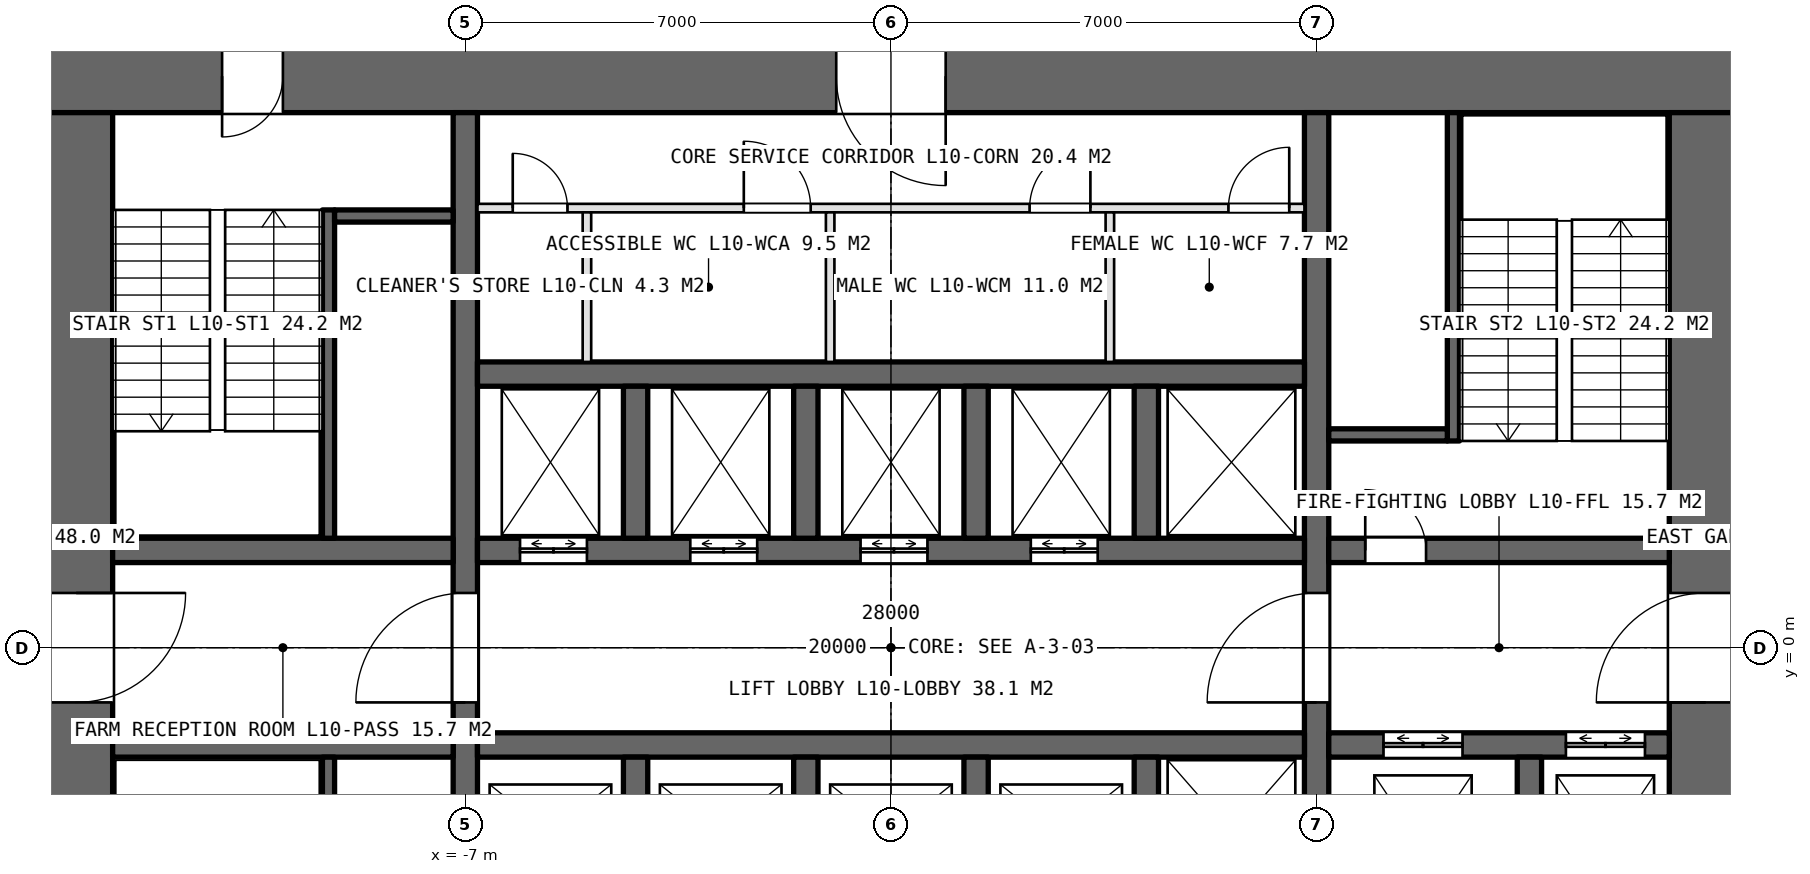
"""IFC4 building model, lengths in metres.
Left out: names, types, materials, properties, quantities, classifications, styles, units other than length and angle.
Written with IfcOpenShell. Run it as: python <this file> out.ifc"""

import sys

from ifc_helpers import new_model, si_unit, direction, frame, frame_2d, origin, place, context, subcontext, project, spatial, rectangle, extrude, element, fill, save


model = new_model("IFC4")
c1 = context("Model", 3, precision=1e-05, world=origin(), true_north=direction((0.0, 1.0)))
c2 = subcontext(c1, "Body", "Model", "MODEL_VIEW")
j1 = project(units=[si_unit("LENGTHUNIT", "METRE"), si_unit("PLANEANGLEUNIT", "RADIAN")], contexts=[c1])
p1 = place(None, origin())
s1 = spatial("IfcSite", under=j1, at=p1, CompositionType="ELEMENT")
p2 = place(p1, origin())
s2 = spatial("IfcBuilding", under=s1, at=p2, CompositionType="ELEMENT")
p3 = place(p2, frame((0.0, 0.0, 50.0)))
s3 = spatial("IfcBuildingStorey", under=s2, at=p3, CompositionType="ELEMENT", Elevation=50.0)
p4 = place(p3, frame((14.0, 9.4, 0.0), z_axis=(0.0, 0.0, 1.0), x_axis=(-1.0, 0.0, 0.0)))
e1 = element("IfcWall", 1, at=p4, inside=s3, PredefinedType="SHEAR", context=c2, shape_type="SweptSolid", body=[
    extrude(rectangle(XDim=28.0, YDim=1.2, at=frame_2d((14.0, 0.0))), origin(), (0.0, 0.0, 1.0), 5.0),
])
p5 = place(p4, frame((24.0, 0.0, 0.0)))
e2 = element("IfcOpeningElement", 2, at=p5, cuts=e1, PredefinedType="OPENING", context=c2, shape_type="SweptSolid", body=[
    extrude(rectangle(XDim=1.0, YDim=2.4, at=frame_2d((0.5, 1.2))), frame((0.0, 0.61, 0.0), z_axis=(0.0, -1.0, 0.0), x_axis=(1.0, 0.0, 0.0)), (0.0, 0.0, 1.0), 1.22),
])
p6 = place(p4, frame((13.1, 0.0, 0.0)))
e3 = element("IfcOpeningElement", 3, at=p6, cuts=e1, PredefinedType="OPENING", context=c2, shape_type="SweptSolid", body=[
    extrude(rectangle(XDim=1.8, YDim=2.4, at=frame_2d((0.9, 1.2))), frame((0.0, 0.61, 0.0), z_axis=(0.0, -1.0, 0.0), x_axis=(1.0, 0.0, 0.0)), (0.0, 0.0, 1.0), 1.22),
])
p7 = place(p3, frame((-13.4, 8.8, 0.0), z_axis=(0.0, 0.0, 1.0), x_axis=(0.0, -1.0, 0.0)))
e4 = element("IfcWall", 4, at=p7, inside=s3, PredefinedType="SHEAR", context=c2, shape_type="SweptSolid", body=[
    extrude(rectangle(XDim=17.6, YDim=1.2, at=frame_2d((8.8, 0.0))), origin(), (0.0, 0.0, 1.0), 5.0),
])
p8 = place(p7, frame((7.9, 0.0, 0.0)))
e5 = element("IfcOpeningElement", 5, at=p8, cuts=e4, PredefinedType="OPENING", context=c2, shape_type="SweptSolid", body=[
    extrude(rectangle(XDim=1.8, YDim=2.4, at=frame_2d((0.9, 1.2))), frame((0.0, 0.61, 0.0), z_axis=(0.0, -1.0, 0.0), x_axis=(1.0, 0.0, 0.0)), (0.0, 0.0, 1.0), 1.22),
])
p9 = place(p7, frame((16.5, 0.0, 0.0)))
e6 = element("IfcOpeningElement", 6, at=p9, cuts=e4, PredefinedType="OPENING", context=c2, shape_type="SweptSolid", body=[
    extrude(rectangle(XDim=1.0, YDim=2.4, at=frame_2d((0.5, 1.2))), frame((0.0, 0.61, 0.0), z_axis=(0.0, -1.0, 0.0), x_axis=(1.0, 0.0, 0.0)), (0.0, 0.0, 1.0), 1.22),
])
p10 = place(p3, frame((13.4, -8.8, 0.0), z_axis=(0.0, 0.0, 1.0), x_axis=(0.0, 1.0, 0.0)))
e7 = element("IfcWall", 7, at=p10, inside=s3, PredefinedType="SHEAR", context=c2, shape_type="SweptSolid", body=[
    extrude(rectangle(XDim=17.6, YDim=1.2, at=frame_2d((8.8, 0.0))), origin(), (0.0, 0.0, 1.0), 5.0),
])
p11 = place(p10, frame((7.9, 0.0, 0.0)))
e8 = element("IfcOpeningElement", 8, at=p11, cuts=e7, PredefinedType="OPENING", context=c2, shape_type="SweptSolid", body=[
    extrude(rectangle(XDim=1.8, YDim=2.4, at=frame_2d((0.9, 1.2))), frame((0.0, 0.61, 0.0), z_axis=(0.0, -1.0, 0.0), x_axis=(1.0, 0.0, 0.0)), (0.0, 0.0, 1.0), 1.22),
])
p12 = place(p3, frame((-7.0, -8.8, 0.0), z_axis=(0.0, 0.0, 1.0), x_axis=(0.0, 1.0, 0.0)))
e9 = element("IfcWall", 9, at=p12, inside=s3, PredefinedType="SHEAR", context=c2, shape_type="SweptSolid", body=[
    extrude(rectangle(XDim=17.6, YDim=0.4, at=frame_2d((8.8, 0.0))), origin(), (0.0, 0.0, 1.0), 5.0),
])
p13 = place(p12, frame((7.9, 0.0, 0.0)))
e10 = element("IfcOpeningElement", 10, at=p13, cuts=e9, PredefinedType="OPENING", context=c2, shape_type="SweptSolid", body=[
    extrude(rectangle(XDim=1.8, YDim=2.4, at=frame_2d((0.9, 1.2))), frame((0.0, 0.21, 0.0), z_axis=(0.0, -1.0, 0.0), x_axis=(1.0, 0.0, 0.0)), (0.0, 0.0, 1.0), 0.42),
])
p14 = place(p3, frame((7.0, -8.8, 0.0), z_axis=(0.0, 0.0, 1.0), x_axis=(0.0, 1.0, 0.0)))
e11 = element("IfcWall", 11, at=p14, inside=s3, PredefinedType="SHEAR", context=c2, shape_type="SweptSolid", body=[
    extrude(rectangle(XDim=17.6, YDim=0.4, at=frame_2d((8.8, 0.0))), origin(), (0.0, 0.0, 1.0), 5.0),
])
p15 = place(p14, frame((7.9, 0.0, 0.0)))
e12 = element("IfcOpeningElement", 12, at=p15, cuts=e11, PredefinedType="OPENING", context=c2, shape_type="SweptSolid", body=[
    extrude(rectangle(XDim=1.8, YDim=2.4, at=frame_2d((0.9, 1.2))), frame((0.0, 0.21, 0.0), z_axis=(0.0, -1.0, 0.0), x_axis=(1.0, 0.0, 0.0)), (0.0, 0.0, 1.0), 0.42),
])
p16 = place(p3, frame((-6.8, 1.6, 0.0), z_axis=(0.0, 0.0, 1.0), x_axis=(1.0, 0.0, 0.0)))
e13 = element("IfcWall", 13, at=p16, inside=s3, PredefinedType="SHEAR", context=c2, shape_type="SweptSolid", body=[
    extrude(rectangle(XDim=13.6, YDim=0.4, at=frame_2d((6.8, 0.0))), origin(), (0.0, 0.0, 1.0), 5.0),
])
p17 = place(p16, frame((0.7, 0.0, 0.0)))
e14 = element("IfcOpeningElement", 14, at=p17, cuts=e13, PredefinedType="OPENING", context=c2, shape_type="SweptSolid", body=[
    extrude(rectangle(XDim=1.1, YDim=2.4, at=frame_2d((0.55, 1.2))), frame((0.0, 0.21, 0.0), z_axis=(0.0, -1.0, 0.0), x_axis=(1.0, 0.0, 0.0)), (0.0, 0.0, 1.0), 0.42),
])
p18 = place(p16, frame((3.5, 0.0, 0.0)))
e15 = element("IfcOpeningElement", 15, at=p18, cuts=e13, PredefinedType="OPENING", context=c2, shape_type="SweptSolid", body=[
    extrude(rectangle(XDim=1.1, YDim=2.4, at=frame_2d((0.55, 1.2))), frame((0.0, 0.21, 0.0), z_axis=(0.0, -1.0, 0.0), x_axis=(1.0, 0.0, 0.0)), (0.0, 0.0, 1.0), 0.42),
])
p19 = place(p16, frame((6.3, 0.0, 0.0)))
e16 = element("IfcOpeningElement", 16, at=p19, cuts=e13, PredefinedType="OPENING", context=c2, shape_type="SweptSolid", body=[
    extrude(rectangle(XDim=1.1, YDim=2.4, at=frame_2d((0.55, 1.2))), frame((0.0, 0.21, 0.0), z_axis=(0.0, -1.0, 0.0), x_axis=(1.0, 0.0, 0.0)), (0.0, 0.0, 1.0), 0.42),
])
p20 = place(p16, frame((9.1, 0.0, 0.0)))
e17 = element("IfcOpeningElement", 17, at=p20, cuts=e13, PredefinedType="OPENING", context=c2, shape_type="SweptSolid", body=[
    extrude(rectangle(XDim=1.1, YDim=2.4, at=frame_2d((0.55, 1.2))), frame((0.0, 0.21, 0.0), z_axis=(0.0, -1.0, 0.0), x_axis=(1.0, 0.0, 0.0)), (0.0, 0.0, 1.0), 0.42),
])
for number, where, z_axis, x_axis in (
    (18, (-6.8, -1.6, 0.0), (0.0, 0.0, 1.0), (1.0, 0.0, 0.0)),
    (19, (-6.8, 4.5, 0.0), (0.0, 0.0, 1.0), (1.0, 0.0, 0.0)),
):
    element("IfcWall", number, at=place(p3, frame(where, z_axis=z_axis, x_axis=x_axis)), inside=s3, PredefinedType="SHEAR", context=c2, shape_type="SweptSolid", body=[
        extrude(rectangle(XDim=13.6, YDim=0.4, at=frame_2d((6.8, 0.0))), origin(), (0.0, 0.0, 1.0), 5.0),
    ])
for number, where, z_axis, x_axis in (
    (20, (-12.8, 1.6, 0.0), (0.0, 0.0, 1.0), (1.0, 0.0, 0.0)),
    (21, (-12.8, -1.6, 0.0), (0.0, 0.0, 1.0), (1.0, 0.0, 0.0)),
):
    element("IfcWall", number, at=place(p3, frame(where, z_axis=z_axis, x_axis=x_axis)), inside=s3, PredefinedType="SHEAR", context=c2, shape_type="SweptSolid", body=[
        extrude(rectangle(XDim=5.6, YDim=0.4, at=frame_2d((2.8, 0.0))), origin(), (0.0, 0.0, 1.0), 5.0),
    ])
p21 = place(p3, frame((7.2, 1.6, 0.0), z_axis=(0.0, 0.0, 1.0), x_axis=(1.0, 0.0, 0.0)))
e22 = element("IfcWall", 22, at=p21, inside=s3, PredefinedType="SHEAR", context=c2, shape_type="SweptSolid", body=[
    extrude(rectangle(XDim=5.6, YDim=0.4, at=frame_2d((2.8, 0.0))), origin(), (0.0, 0.0, 1.0), 5.0),
])
p22 = place(p21, frame((0.6, 0.0, 0.0)))
e23 = element("IfcOpeningElement", 23, at=p22, cuts=e22, PredefinedType="OPENING", context=c2, shape_type="SweptSolid", body=[
    extrude(rectangle(XDim=1.0, YDim=2.4, at=frame_2d((0.5, 1.2))), frame((0.0, 0.21, 0.0), z_axis=(0.0, -1.0, 0.0), x_axis=(1.0, 0.0, 0.0)), (0.0, 0.0, 1.0), 0.42),
])
p23 = place(p3, frame((7.2, -1.6, 0.0), z_axis=(0.0, 0.0, 1.0), x_axis=(1.0, 0.0, 0.0)))
e24 = element("IfcWall", 24, at=p23, inside=s3, PredefinedType="SHEAR", context=c2, shape_type="SweptSolid", body=[
    extrude(rectangle(XDim=5.6, YDim=0.4, at=frame_2d((2.8, 0.0))), origin(), (0.0, 0.0, 1.0), 5.0),
])
p24 = place(p23, frame((0.9, 0.0, 0.0)))
e25 = element("IfcOpeningElement", 25, at=p24, cuts=e24, PredefinedType="OPENING", context=c2, shape_type="SweptSolid", body=[
    extrude(rectangle(XDim=1.3, YDim=2.4, at=frame_2d((0.65, 1.2))), frame((0.0, 0.21, 0.0), z_axis=(0.0, -1.0, 0.0), x_axis=(1.0, 0.0, 0.0)), (0.0, 0.0, 1.0), 0.42),
])
p25 = place(p23, frame((3.9, 0.0, 0.0)))
e26 = element("IfcOpeningElement", 26, at=p25, cuts=e24, PredefinedType="OPENING", context=c2, shape_type="SweptSolid", body=[
    extrude(rectangle(XDim=1.3, YDim=2.4, at=frame_2d((0.65, 1.2))), frame((0.0, 0.21, 0.0), z_axis=(0.0, -1.0, 0.0), x_axis=(1.0, 0.0, 0.0)), (0.0, 0.0, 1.0), 0.42),
])
p26 = place(p3, frame((10.5, -4.8, 0.0), z_axis=(0.0, 0.0, 1.0), x_axis=(0.0, 1.0, 0.0)))
e27 = element("IfcWall", 27, at=p26, inside=s3, PredefinedType="SHEAR", context=c2, shape_type="SweptSolid", body=[
    extrude(rectangle(XDim=3.0, YDim=0.4, at=frame_2d((1.5, 0.0))), origin(), (0.0, 0.0, 1.0), 5.0),
])
for number, where, z_axis, x_axis in (
    (28, (-4.2, 1.8, 0.0), (0.0, 0.0, 1.0), (0.0, 1.0, 0.0)),
    (29, (-4.2, -4.3, 0.0), (0.0, 0.0, 1.0), (0.0, 1.0, 0.0)),
    (30, (-1.4, 1.8, 0.0), (0.0, 0.0, 1.0), (0.0, 1.0, 0.0)),
    (31, (-1.4, -4.3, 0.0), (0.0, 0.0, 1.0), (0.0, 1.0, 0.0)),
    (32, (1.4, 1.8, 0.0), (0.0, 0.0, 1.0), (0.0, 1.0, 0.0)),
    (33, (1.4, -4.3, 0.0), (0.0, 0.0, 1.0), (0.0, 1.0, 0.0)),
    (34, (4.2, 1.8, 0.0), (0.0, 0.0, 1.0), (0.0, 1.0, 0.0)),
    (35, (4.2, -4.3, 0.0), (0.0, 0.0, 1.0), (0.0, 1.0, 0.0)),
):
    element("IfcWall", number, at=place(p3, frame(where, z_axis=z_axis, x_axis=x_axis)), inside=s3, PredefinedType="SHEAR", context=c2, shape_type="SweptSolid", body=[
        extrude(rectangle(XDim=2.5, YDim=0.4, at=frame_2d((1.25, 0.0))), origin(), (0.0, 0.0, 1.0), 5.0),
    ])
p27 = place(p3, frame((-6.8, 7.23, 0.0), z_axis=(0.0, 0.0, 1.0), x_axis=(1.0, 0.0, 0.0)))
e36 = element("IfcWall", 36, at=p27, inside=s3, PredefinedType="PARTITIONING", context=c2, shape_type="SweptSolid", body=[
    extrude(rectangle(XDim=13.6, YDim=0.14, at=frame_2d((6.8, 0.0))), origin(), (0.0, 0.0, 1.0), 4.75),
])
p28 = place(p27, frame((0.58, 0.0, 0.0)))
e37 = element("IfcOpeningElement", 37, at=p28, cuts=e36, PredefinedType="OPENING", context=c2, shape_type="SweptSolid", body=[
    extrude(rectangle(XDim=0.9, YDim=2.4, at=frame_2d((0.45, 1.2))), frame((0.0, 0.08, 0.0), z_axis=(0.0, -1.0, 0.0), x_axis=(1.0, 0.0, 0.0)), (0.0, 0.0, 1.0), 0.16),
])
p29 = place(p27, frame((4.38, 0.0, 0.0)))
e38 = element("IfcOpeningElement", 38, at=p29, cuts=e36, PredefinedType="OPENING", context=c2, shape_type="SweptSolid", body=[
    extrude(rectangle(XDim=1.1, YDim=2.4, at=frame_2d((0.55, 1.2))), frame((0.0, 0.08, 0.0), z_axis=(0.0, -1.0, 0.0), x_axis=(1.0, 0.0, 0.0)), (0.0, 0.0, 1.0), 0.16),
])
p30 = place(p27, frame((9.08, 0.0, 0.0)))
e39 = element("IfcOpeningElement", 39, at=p30, cuts=e36, PredefinedType="OPENING", context=c2, shape_type="SweptSolid", body=[
    extrude(rectangle(XDim=1.0, YDim=2.4, at=frame_2d((0.5, 1.2))), frame((0.0, 0.08, 0.0), z_axis=(0.0, -1.0, 0.0), x_axis=(1.0, 0.0, 0.0)), (0.0, 0.0, 1.0), 0.16),
])
p31 = place(p27, frame((12.35, 0.0, 0.0)))
e40 = element("IfcOpeningElement", 40, at=p31, cuts=e36, PredefinedType="OPENING", context=c2, shape_type="SweptSolid", body=[
    extrude(rectangle(XDim=1.0, YDim=2.4, at=frame_2d((0.5, 1.2))), frame((0.0, 0.08, 0.0), z_axis=(0.0, -1.0, 0.0), x_axis=(1.0, 0.0, 0.0)), (0.0, 0.0, 1.0), 0.16),
])
for number, where, z_axis, x_axis in (
    (41, (-5.0, 4.7, 0.0), (0.0, 0.0, 1.0), (0.0, 1.0, 0.0)),
    (42, (-1.0, 4.7, 0.0), (0.0, 0.0, 1.0), (0.0, 1.0, 0.0)),
    (43, (3.6, 4.7, 0.0), (0.0, 0.0, 1.0), (0.0, 1.0, 0.0)),
):
    element("IfcWall", number, at=place(p3, frame(where, z_axis=z_axis, x_axis=x_axis)), inside=s3, PredefinedType="PARTITIONING", context=c2, shape_type="SweptSolid", body=[
        extrude(rectangle(XDim=2.46, YDim=0.14, at=frame_2d((1.23, 0.0))), origin(), (0.0, 0.0, 1.0), 4.75),
    ])
p32 = place(p3, frame((-9.25, 7.2, 0.0), z_axis=(0.0, 0.0, 1.0), x_axis=(0.0, -1.0, 0.0)))
e44 = element("IfcWall", 44, at=p32, inside=s3, PredefinedType="SOLIDWALL", context=c2, shape_type="SweptSolid", body=[
    extrude(rectangle(XDim=5.4, YDim=0.2, at=frame_2d((2.7, 0.0))), origin(), (0.0, 0.0, 1.0), 5.0),
])
p33 = place(p3, frame((-9.15, 7.1, 0.0), z_axis=(0.0, 0.0, 1.0), x_axis=(1.0, 0.0, 0.0)))
e45 = element("IfcWall", 45, at=p33, inside=s3, PredefinedType="SOLIDWALL", context=c2, shape_type="SweptSolid", body=[
    extrude(rectangle(XDim=1.95, YDim=0.2, at=frame_2d((0.975, 0.0))), origin(), (0.0, 0.0, 1.0), 5.0),
])
p34 = place(p3, frame((-9.25, -7.2, 0.0), z_axis=(0.0, 0.0, 1.0), x_axis=(0.0, 1.0, 0.0)))
e46 = element("IfcWall", 46, at=p34, inside=s3, PredefinedType="SOLIDWALL", context=c2, shape_type="SweptSolid", body=[
    extrude(rectangle(XDim=5.4, YDim=0.2, at=frame_2d((2.7, 0.0))), origin(), (0.0, 0.0, 1.0), 5.0),
])
p35 = place(p3, frame((9.25, 3.4, 0.0), z_axis=(0.0, 0.0, 1.0), x_axis=(0.0, 1.0, 0.0)))
e47 = element("IfcWall", 47, at=p35, inside=s3, PredefinedType="SOLIDWALL", context=c2, shape_type="SweptSolid", body=[
    extrude(rectangle(XDim=5.4, YDim=0.2, at=frame_2d((2.7, 0.0))), origin(), (0.0, 0.0, 1.0), 5.0),
])
p36 = place(p3, frame((9.15, 3.5, 0.0), z_axis=(0.0, 0.0, 1.0), x_axis=(-1.0, 0.0, 0.0)))
e48 = element("IfcWall", 48, at=p36, inside=s3, PredefinedType="SOLIDWALL", context=c2, shape_type="SweptSolid", body=[
    extrude(rectangle(XDim=1.95, YDim=0.2, at=frame_2d((0.975, 0.0))), origin(), (0.0, 0.0, 1.0), 5.0),
])
p37 = place(p8, origin())
e49 = element("IfcDoor", 49, at=p37, inside=s3, OperationType="DOUBLE_DOOR_SINGLE_SWING", PredefinedType="DOOR", context=c2, shape_type="SweptSolid", body=[
    extrude(rectangle(XDim=1.8, YDim=2.4, at=frame_2d((0.9, 1.2))), frame((0.0, 0.025, 0.0), z_axis=(0.0, -1.0, 0.0), x_axis=(1.0, 0.0, 0.0)), (0.0, 0.0, 1.0), 0.05),
])
fill(e5, e49)
p38 = place(p11, origin())
e50 = element("IfcDoor", 50, at=p38, inside=s3, OperationType="DOUBLE_DOOR_SINGLE_SWING", PredefinedType="DOOR", context=c2, shape_type="SweptSolid", body=[
    extrude(rectangle(XDim=1.8, YDim=2.4, at=frame_2d((0.9, 1.2))), frame((0.0, 0.025, 0.0), z_axis=(0.0, -1.0, 0.0), x_axis=(1.0, 0.0, 0.0)), (0.0, 0.0, 1.0), 0.05),
])
fill(e8, e50)
p39 = place(p13, origin())
e51 = element("IfcDoor", 51, at=p39, inside=s3, OperationType="DOUBLE_DOOR_SINGLE_SWING", PredefinedType="DOOR", context=c2, shape_type="SweptSolid", body=[
    extrude(rectangle(XDim=1.8, YDim=2.4, at=frame_2d((0.9, 1.2))), frame((0.0, 0.025, 0.0), z_axis=(0.0, -1.0, 0.0), x_axis=(1.0, 0.0, 0.0)), (0.0, 0.0, 1.0), 0.05),
])
fill(e10, e51)
p40 = place(p15, origin())
e52 = element("IfcDoor", 52, at=p40, inside=s3, OperationType="DOUBLE_DOOR_SINGLE_SWING", PredefinedType="DOOR", context=c2, shape_type="SweptSolid", body=[
    extrude(rectangle(XDim=1.8, YDim=2.4, at=frame_2d((0.9, 1.2))), frame((0.0, 0.025, 0.0), z_axis=(0.0, -1.0, 0.0), x_axis=(1.0, 0.0, 0.0)), (0.0, 0.0, 1.0), 0.05),
])
fill(e12, e52)
p41 = place(p5, origin())
e53 = element("IfcDoor", 53, at=p41, inside=s3, OperationType="SINGLE_SWING_RIGHT", PredefinedType="DOOR", context=c2, shape_type="SweptSolid", body=[
    extrude(rectangle(XDim=1.0, YDim=2.4, at=frame_2d((0.5, 1.2))), frame((0.0, 0.025, 0.0), z_axis=(0.0, -1.0, 0.0), x_axis=(1.0, 0.0, 0.0)), (0.0, 0.0, 1.0), 0.05),
])
fill(e2, e53)
p42 = place(p22, origin())
e54 = element("IfcDoor", 54, at=p42, inside=s3, OperationType="SINGLE_SWING_LEFT", PredefinedType="DOOR", context=c2, shape_type="SweptSolid", body=[
    extrude(rectangle(XDim=1.0, YDim=2.4, at=frame_2d((0.5, 1.2))), frame((0.0, 0.025, 0.0), z_axis=(0.0, -1.0, 0.0), x_axis=(1.0, 0.0, 0.0)), (0.0, 0.0, 1.0), 0.05),
])
fill(e23, e54)
p43 = place(p28, origin())
e55 = element("IfcDoor", 55, at=p43, inside=s3, OperationType="SINGLE_SWING_LEFT", PredefinedType="DOOR", context=c2, shape_type="SweptSolid", body=[
    extrude(rectangle(XDim=0.9, YDim=2.4, at=frame_2d((0.45, 1.2))), frame((0.0, 0.025, 0.0), z_axis=(0.0, -1.0, 0.0), x_axis=(1.0, 0.0, 0.0)), (0.0, 0.0, 1.0), 0.05),
])
fill(e37, e55)
p44 = place(p29, origin())
e56 = element("IfcDoor", 56, at=p44, inside=s3, OperationType="SINGLE_SWING_LEFT", PredefinedType="DOOR", context=c2, shape_type="SweptSolid", body=[
    extrude(rectangle(XDim=1.1, YDim=2.4, at=frame_2d((0.55, 1.2))), frame((0.0, 0.025, 0.0), z_axis=(0.0, -1.0, 0.0), x_axis=(1.0, 0.0, 0.0)), (0.0, 0.0, 1.0), 0.05),
])
fill(e38, e56)
p45 = place(p30, origin())
e57 = element("IfcDoor", 57, at=p45, inside=s3, OperationType="SINGLE_SWING_RIGHT", PredefinedType="DOOR", context=c2, shape_type="SweptSolid", body=[
    extrude(rectangle(XDim=1.0, YDim=2.4, at=frame_2d((0.5, 1.2))), frame((0.0, 0.025, 0.0), z_axis=(0.0, -1.0, 0.0), x_axis=(1.0, 0.0, 0.0)), (0.0, 0.0, 1.0), 0.05),
])
fill(e39, e57)
p46 = place(p31, origin())
e58 = element("IfcDoor", 58, at=p46, inside=s3, OperationType="SINGLE_SWING_RIGHT", PredefinedType="DOOR", context=c2, shape_type="SweptSolid", body=[
    extrude(rectangle(XDim=1.0, YDim=2.4, at=frame_2d((0.5, 1.2))), frame((0.0, 0.025, 0.0), z_axis=(0.0, -1.0, 0.0), x_axis=(1.0, 0.0, 0.0)), (0.0, 0.0, 1.0), 0.05),
])
fill(e40, e58)
p47 = place(p6, origin())
e59 = element("IfcDoor", 59, at=p47, inside=s3, OperationType="DOUBLE_DOOR_SINGLE_SWING", PredefinedType="DOOR", context=c2, shape_type="SweptSolid", body=[
    extrude(rectangle(XDim=1.8, YDim=2.4, at=frame_2d((0.9, 1.2))), frame((0.0, 0.025, 0.0), z_axis=(0.0, -1.0, 0.0), x_axis=(1.0, 0.0, 0.0)), (0.0, 0.0, 1.0), 0.05),
])
fill(e3, e59)
p48 = place(p17, origin())
e60 = element("IfcDoor", 60, at=p48, inside=s3, OperationType="DOUBLE_DOOR_SLIDING", PredefinedType="DOOR", context=c2, shape_type="SweptSolid", body=[
    extrude(rectangle(XDim=1.1, YDim=2.4, at=frame_2d((0.55, 1.2))), frame((0.0, 0.025, 0.0), z_axis=(0.0, -1.0, 0.0), x_axis=(1.0, 0.0, 0.0)), (0.0, 0.0, 1.0), 0.05),
])
fill(e14, e60)
p49 = place(p18, origin())
e61 = element("IfcDoor", 61, at=p49, inside=s3, OperationType="DOUBLE_DOOR_SLIDING", PredefinedType="DOOR", context=c2, shape_type="SweptSolid", body=[
    extrude(rectangle(XDim=1.1, YDim=2.4, at=frame_2d((0.55, 1.2))), frame((0.0, 0.025, 0.0), z_axis=(0.0, -1.0, 0.0), x_axis=(1.0, 0.0, 0.0)), (0.0, 0.0, 1.0), 0.05),
])
fill(e15, e61)
p50 = place(p19, origin())
e62 = element("IfcDoor", 62, at=p50, inside=s3, OperationType="DOUBLE_DOOR_SLIDING", PredefinedType="DOOR", context=c2, shape_type="SweptSolid", body=[
    extrude(rectangle(XDim=1.1, YDim=2.4, at=frame_2d((0.55, 1.2))), frame((0.0, 0.025, 0.0), z_axis=(0.0, -1.0, 0.0), x_axis=(1.0, 0.0, 0.0)), (0.0, 0.0, 1.0), 0.05),
])
fill(e16, e62)
p51 = place(p20, origin())
e63 = element("IfcDoor", 63, at=p51, inside=s3, OperationType="DOUBLE_DOOR_SLIDING", PredefinedType="DOOR", context=c2, shape_type="SweptSolid", body=[
    extrude(rectangle(XDim=1.1, YDim=2.4, at=frame_2d((0.55, 1.2))), frame((0.0, 0.025, 0.0), z_axis=(0.0, -1.0, 0.0), x_axis=(1.0, 0.0, 0.0)), (0.0, 0.0, 1.0), 0.05),
])
fill(e17, e63)
p52 = place(p24, origin())
e64 = element("IfcDoor", 64, at=p52, inside=s3, OperationType="DOUBLE_DOOR_SLIDING", PredefinedType="DOOR", context=c2, shape_type="SweptSolid", body=[
    extrude(rectangle(XDim=1.3, YDim=2.4, at=frame_2d((0.65, 1.2))), frame((0.0, 0.025, 0.0), z_axis=(0.0, -1.0, 0.0), x_axis=(1.0, 0.0, 0.0)), (0.0, 0.0, 1.0), 0.05),
])
fill(e25, e64)
p53 = place(p25, origin())
e65 = element("IfcDoor", 65, at=p53, inside=s3, OperationType="DOUBLE_DOOR_SLIDING", PredefinedType="DOOR", context=c2, shape_type="SweptSolid", body=[
    extrude(rectangle(XDim=1.3, YDim=2.4, at=frame_2d((0.65, 1.2))), frame((0.0, 0.025, 0.0), z_axis=(0.0, -1.0, 0.0), x_axis=(1.0, 0.0, 0.0)), (0.0, 0.0, 1.0), 0.05),
])
fill(e26, e65)
save(model, sys.argv[1])
